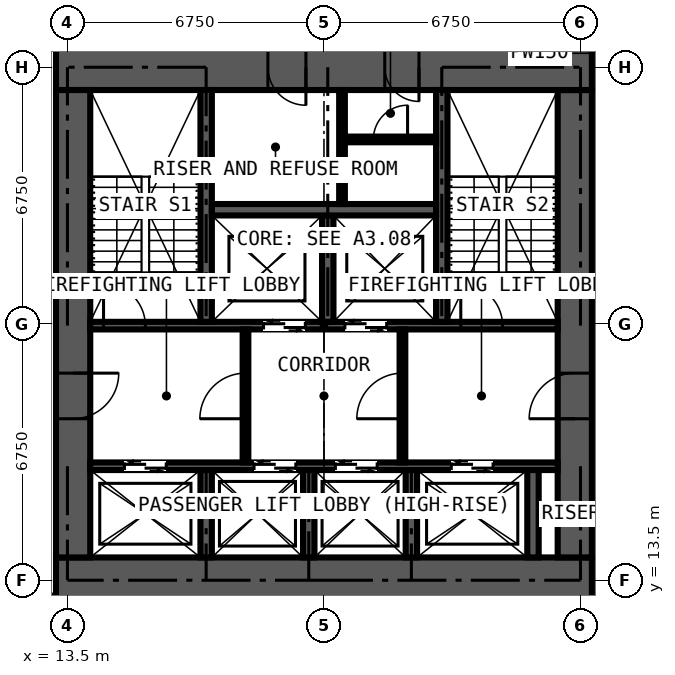
"""IFC4 building model, lengths in metres.
Left out: names, types, materials, properties, quantities, classifications, styles, units other than length and angle.
Written with IfcOpenShell. Run it as: python <this file> out.ifc"""

import sys

from ifc_helpers import new_model, si_unit, direction, frame, frame_2d, origin, place, context, subcontext, project, spatial, rectangle, extrude, element, fill, save


model = new_model("IFC4")
c1 = context("Model", 3, precision=1e-05, world=origin(), true_north=direction((0.0, 1.0)))
c2 = subcontext(c1, "Body", "Model", "MODEL_VIEW")
j1 = project(units=[si_unit("LENGTHUNIT", "METRE"), si_unit("PLANEANGLEUNIT", "RADIAN")], contexts=[c1])
p1 = place(None, origin())
s1 = spatial("IfcSite", under=j1, at=p1, CompositionType="ELEMENT")
p2 = place(p1, origin())
s2 = spatial("IfcBuilding", under=s1, at=p2, CompositionType="ELEMENT")
p3 = place(p2, frame((0.0, 0.0, 225.9)))
s3 = spatial("IfcBuildingStorey", under=s2, at=p3, CompositionType="ELEMENT", Elevation=225.9)
p4 = place(p3, frame((13.2, 13.5, 0.0), z_axis=(0.0, 0.0, 1.0), x_axis=(1.0, 0.0, 0.0)))
e1 = element("IfcWall", 1, at=p4, inside=s3, PredefinedType="SHEAR", context=c2, shape_type="SweptSolid", body=[
    extrude(rectangle(XDim=14.1, YDim=1.2, at=frame_2d((7.05, 0.0))), origin(), (0.0, 0.0, 1.0), 3.6),
])
p5 = place(p3, frame((26.85, 14.1, 0.0), z_axis=(0.0, 0.0, 1.0), x_axis=(0.0, 1.0, 0.0)))
e2 = element("IfcWall", 2, at=p5, inside=s3, PredefinedType="SHEAR", context=c2, shape_type="SweptSolid", body=[
    extrude(rectangle(XDim=12.3, YDim=0.9, at=frame_2d((6.15, 0.0))), origin(), (0.0, 0.0, 1.0), 3.6),
])
p6 = place(p5, frame((3.65, 0.0, 0.0)))
e3 = element("IfcOpeningElement", 3, at=p6, cuts=e2, PredefinedType="OPENING", context=c2, shape_type="SweptSolid", body=[
    extrude(rectangle(XDim=1.2, YDim=2.2, at=frame_2d((0.6, 1.1))), frame((0.0, 0.46, 0.0), z_axis=(0.0, -1.0, 0.0), x_axis=(1.0, 0.0, 0.0)), (0.0, 0.0, 1.0), 0.92),
])
p7 = place(p3, frame((27.3, 27.0, 0.0), z_axis=(0.0, 0.0, 1.0), x_axis=(-1.0, 0.0, 0.0)))
e4 = element("IfcWall", 4, at=p7, inside=s3, PredefinedType="SHEAR", context=c2, shape_type="SweptSolid", body=[
    extrude(rectangle(XDim=14.1, YDim=1.2, at=frame_2d((7.05, 0.0))), origin(), (0.0, 0.0, 1.0), 3.6),
])
p8 = place(p7, frame((4.55, 0.0, 0.0)))
e5 = element("IfcOpeningElement", 5, at=p8, cuts=e4, PredefinedType="OPENING", context=c2, shape_type="SweptSolid", body=[
    extrude(rectangle(XDim=0.9, YDim=2.2, at=frame_2d((0.45, 1.1))), frame((0.0, 0.61, 0.0), z_axis=(0.0, -1.0, 0.0), x_axis=(1.0, 0.0, 0.0)), (0.0, 0.0, 1.0), 1.22),
])
p9 = place(p7, frame((7.525, 0.0, 0.0)))
e6 = element("IfcOpeningElement", 6, at=p9, cuts=e4, PredefinedType="OPENING", context=c2, shape_type="SweptSolid", body=[
    extrude(rectangle(XDim=1.0, YDim=2.2, at=frame_2d((0.5, 1.1))), frame((0.0, 0.61, 0.0), z_axis=(0.0, -1.0, 0.0), x_axis=(1.0, 0.0, 0.0)), (0.0, 0.0, 1.0), 1.22),
])
p10 = place(p3, frame((13.65, 26.4, 0.0), z_axis=(0.0, 0.0, 1.0), x_axis=(0.0, -1.0, 0.0)))
e7 = element("IfcWall", 7, at=p10, inside=s3, PredefinedType="SHEAR", context=c2, shape_type="SweptSolid", body=[
    extrude(rectangle(XDim=12.3, YDim=0.9, at=frame_2d((6.15, 0.0))), origin(), (0.0, 0.0, 1.0), 3.6),
])
p11 = place(p10, frame((7.45, 0.0, 0.0)))
e8 = element("IfcOpeningElement", 8, at=p11, cuts=e7, PredefinedType="OPENING", context=c2, shape_type="SweptSolid", body=[
    extrude(rectangle(XDim=1.2, YDim=2.2, at=frame_2d((0.6, 1.1))), frame((0.0, 0.46, 0.0), z_axis=(0.0, -1.0, 0.0), x_axis=(1.0, 0.0, 0.0)), (0.0, 0.0, 1.0), 0.92),
])
p12 = place(p3, frame((14.1, 16.5, 0.0), z_axis=(0.0, 0.0, 1.0), x_axis=(1.0, 0.0, 0.0)))
e9 = element("IfcWall", 9, at=p12, inside=s3, PredefinedType="SHEAR", context=c2, shape_type="SweptSolid", body=[
    extrude(rectangle(XDim=12.3, YDim=0.2, at=frame_2d((6.15, 0.0))), origin(), (0.0, 0.0, 1.0), 3.6),
])
p13 = place(p12, frame((0.9, 0.0, 0.0)))
e10 = element("IfcOpeningElement", 10, at=p13, cuts=e9, PredefinedType="OPENING", context=c2, shape_type="SweptSolid", body=[
    extrude(rectangle(XDim=1.1, YDim=2.2, at=frame_2d((0.55, 1.1))), frame((0.0, 0.11, 0.0), z_axis=(0.0, -1.0, 0.0), x_axis=(1.0, 0.0, 0.0)), (0.0, 0.0, 1.0), 0.22),
])
p14 = place(p12, frame((4.31, 0.0, 0.0)))
e11 = element("IfcOpeningElement", 11, at=p14, cuts=e9, PredefinedType="OPENING", context=c2, shape_type="SweptSolid", body=[
    extrude(rectangle(XDim=1.1, YDim=2.2, at=frame_2d((0.55, 1.1))), frame((0.0, 0.11, 0.0), z_axis=(0.0, -1.0, 0.0), x_axis=(1.0, 0.0, 0.0)), (0.0, 0.0, 1.0), 0.22),
])
p15 = place(p12, frame((6.45, 0.0, 0.0)))
e12 = element("IfcOpeningElement", 12, at=p15, cuts=e9, PredefinedType="OPENING", context=c2, shape_type="SweptSolid", body=[
    extrude(rectangle(XDim=1.1, YDim=2.2, at=frame_2d((0.55, 1.1))), frame((0.0, 0.11, 0.0), z_axis=(0.0, -1.0, 0.0), x_axis=(1.0, 0.0, 0.0)), (0.0, 0.0, 1.0), 0.22),
])
p16 = place(p12, frame((9.5, 0.0, 0.0)))
e13 = element("IfcOpeningElement", 13, at=p16, cuts=e9, PredefinedType="OPENING", context=c2, shape_type="SweptSolid", body=[
    extrude(rectangle(XDim=1.1, YDim=2.2, at=frame_2d((0.55, 1.1))), frame((0.0, 0.11, 0.0), z_axis=(0.0, -1.0, 0.0), x_axis=(1.0, 0.0, 0.0)), (0.0, 0.0, 1.0), 0.22),
])
p17 = place(p3, frame((14.1, 20.2, 0.0), z_axis=(0.0, 0.0, 1.0), x_axis=(1.0, 0.0, 0.0)))
e14 = element("IfcWall", 14, at=p17, inside=s3, PredefinedType="SHEAR", context=c2, shape_type="SweptSolid", body=[
    extrude(rectangle(XDim=12.3, YDim=0.2, at=frame_2d((6.15, 0.0))), origin(), (0.0, 0.0, 1.0), 3.6),
])
p18 = place(p17, frame((4.56, 0.0, 0.0)))
e15 = element("IfcOpeningElement", 15, at=p18, cuts=e14, PredefinedType="OPENING", context=c2, shape_type="SweptSolid", body=[
    extrude(rectangle(XDim=1.1, YDim=2.2, at=frame_2d((0.55, 1.1))), frame((0.0, 0.11, 0.0), z_axis=(0.0, -1.0, 0.0), x_axis=(1.0, 0.0, 0.0)), (0.0, 0.0, 1.0), 0.22),
])
p19 = place(p17, frame((6.7, 0.0, 0.0)))
e16 = element("IfcOpeningElement", 16, at=p19, cuts=e14, PredefinedType="OPENING", context=c2, shape_type="SweptSolid", body=[
    extrude(rectangle(XDim=1.1, YDim=2.2, at=frame_2d((0.55, 1.1))), frame((0.0, 0.11, 0.0), z_axis=(0.0, -1.0, 0.0), x_axis=(1.0, 0.0, 0.0)), (0.0, 0.0, 1.0), 0.22),
])
p20 = place(p17, frame((0.35, 0.0, 0.0)))
e17 = element("IfcOpeningElement", 17, at=p20, cuts=e14, PredefinedType="OPENING", context=c2, shape_type="SweptSolid", body=[
    extrude(rectangle(XDim=1.1, YDim=2.2, at=frame_2d((0.55, 1.1))), frame((0.0, 0.11, 0.0), z_axis=(0.0, -1.0, 0.0), x_axis=(1.0, 0.0, 0.0)), (0.0, 0.0, 1.0), 0.22),
])
p21 = place(p17, frame((9.75, 0.0, 0.0)))
e18 = element("IfcOpeningElement", 18, at=p21, cuts=e14, PredefinedType="OPENING", context=c2, shape_type="SweptSolid", body=[
    extrude(rectangle(XDim=1.1, YDim=2.2, at=frame_2d((0.55, 1.1))), frame((0.0, 0.11, 0.0), z_axis=(0.0, -1.0, 0.0), x_axis=(1.0, 0.0, 0.0)), (0.0, 0.0, 1.0), 0.22),
])
for number, where, z_axis, x_axis in (
    (19, (17.15, 20.3, 0.0), (0.0, 0.0, 1.0), (0.0, 1.0, 0.0)),
    (20, (23.35, 20.3, 0.0), (0.0, 0.0, 1.0), (0.0, 1.0, 0.0)),
):
    element("IfcWall", number, at=place(p3, frame(where, z_axis=z_axis, x_axis=x_axis)), inside=s3, PredefinedType="SHEAR", context=c2, shape_type="SweptSolid", body=[
        extrude(rectangle(XDim=6.1, YDim=0.3, at=frame_2d((3.05, 0.0))), origin(), (0.0, 0.0, 1.0), 3.6),
    ])
p22 = place(p3, frame((20.35, 20.3, 0.0), z_axis=(0.0, 0.0, 1.0), x_axis=(0.0, 1.0, 0.0)))
e21 = element("IfcWall", 21, at=p22, inside=s3, PredefinedType="SHEAR", context=c2, shape_type="SweptSolid", body=[
    extrude(rectangle(XDim=2.8, YDim=0.3, at=frame_2d((1.4, 0.0))), origin(), (0.0, 0.0, 1.0), 3.6),
])
p23 = place(p3, frame((17.3, 23.25, 0.0), z_axis=(0.0, 0.0, 1.0), x_axis=(1.0, 0.0, 0.0)))
e22 = element("IfcWall", 22, at=p23, inside=s3, PredefinedType="SHEAR", context=c2, shape_type="SweptSolid", body=[
    extrude(rectangle(XDim=5.9, YDim=0.3, at=frame_2d((2.95, 0.0))), origin(), (0.0, 0.0, 1.0), 3.6),
])
for number, where, z_axis, x_axis in (
    (23, (17.15, 14.1, 0.0), (0.0, 0.0, 1.0), (0.0, 1.0, 0.0)),
    (24, (19.85, 14.1, 0.0), (0.0, 0.0, 1.0), (0.0, 1.0, 0.0)),
    (25, (22.55, 14.1, 0.0), (0.0, 0.0, 1.0), (0.0, 1.0, 0.0)),
    (26, (25.75, 14.1, 0.0), (0.0, 0.0, 1.0), (0.0, 1.0, 0.0)),
):
    element("IfcWall", number, at=place(p3, frame(where, z_axis=z_axis, x_axis=x_axis)), inside=s3, PredefinedType="SHEAR", context=c2, shape_type="SweptSolid", body=[
        extrude(rectangle(XDim=2.3, YDim=0.3, at=frame_2d((1.15, 0.0))), origin(), (0.0, 0.0, 1.0), 3.6),
    ])
p24 = place(p3, frame((18.185, 16.6, 0.0), z_axis=(0.0, 0.0, 1.0), x_axis=(0.0, 1.0, 0.0)))
e27 = element("IfcWall", 27, at=p24, inside=s3, PredefinedType="PARTITIONING", context=c2, shape_type="SweptSolid", body=[
    extrude(rectangle(XDim=3.5, YDim=0.15, at=frame_2d((1.75, 0.0))), origin(), (0.0, 0.0, 1.0), 3.375),
])
p25 = place(p24, frame((1.15, 0.0, 0.0)))
e28 = element("IfcOpeningElement", 28, at=p25, cuts=e27, PredefinedType="OPENING", context=c2, shape_type="SweptSolid", body=[
    extrude(rectangle(XDim=1.2, YDim=2.2, at=frame_2d((0.6, 1.1))), frame((0.0, 0.085, 0.0), z_axis=(0.0, -1.0, 0.0), x_axis=(1.0, 0.0, 0.0)), (0.0, 0.0, 1.0), 0.17),
])
p26 = place(p3, frame((22.315, 16.6, 0.0), z_axis=(0.0, 0.0, 1.0), x_axis=(0.0, 1.0, 0.0)))
e29 = element("IfcWall", 29, at=p26, inside=s3, PredefinedType="PARTITIONING", context=c2, shape_type="SweptSolid", body=[
    extrude(rectangle(XDim=3.5, YDim=0.15, at=frame_2d((1.75, 0.0))), origin(), (0.0, 0.0, 1.0), 3.375),
])
p27 = place(p26, frame((1.15, 0.0, 0.0)))
e30 = element("IfcOpeningElement", 30, at=p27, cuts=e29, PredefinedType="OPENING", context=c2, shape_type="SweptSolid", body=[
    extrude(rectangle(XDim=1.2, YDim=2.2, at=frame_2d((0.6, 1.1))), frame((0.0, 0.085, 0.0), z_axis=(0.0, -1.0, 0.0), x_axis=(1.0, 0.0, 0.0)), (0.0, 0.0, 1.0), 0.17),
])
p28 = place(p3, frame((20.725, 23.4, 0.0), z_axis=(0.0, 0.0, 1.0), x_axis=(0.0, 1.0, 0.0)))
e31 = element("IfcWall", 31, at=p28, inside=s3, PredefinedType="PARTITIONING", context=c2, shape_type="SweptSolid", body=[
    extrude(rectangle(XDim=3.0, YDim=0.15, at=frame_2d((1.5, 0.0))), origin(), (0.0, 0.0, 1.0), 3.375),
])
p29 = place(p3, frame((20.8, 25.1, 0.0), z_axis=(0.0, 0.0, 1.0), x_axis=(1.0, 0.0, 0.0)))
e32 = element("IfcWall", 32, at=p29, inside=s3, PredefinedType="PARTITIONING", context=c2, shape_type="SweptSolid", body=[
    extrude(rectangle(XDim=2.4, YDim=0.15, at=frame_2d((1.2, 0.0))), origin(), (0.0, 0.0, 1.0), 3.375),
])
p30 = place(p29, frame((0.75, 0.0, 0.0)))
e33 = element("IfcOpeningElement", 33, at=p30, cuts=e32, PredefinedType="OPENING", context=c2, shape_type="SweptSolid", body=[
    extrude(rectangle(XDim=0.9, YDim=2.2, at=frame_2d((0.45, 1.1))), frame((0.0, 0.085, 0.0), z_axis=(0.0, -1.0, 0.0), x_axis=(1.0, 0.0, 0.0)), (0.0, 0.0, 1.0), 0.17),
])
p31 = place(p13, origin())
e34 = element("IfcDoor", 34, at=p31, inside=s3, OperationType="DOUBLE_DOOR_SLIDING", PredefinedType="DOOR", context=c2, shape_type="SweptSolid", body=[
    extrude(rectangle(XDim=1.1, YDim=2.2, at=frame_2d((0.55, 1.1))), frame((0.0, 0.025, 0.0), z_axis=(0.0, -1.0, 0.0), x_axis=(1.0, 0.0, 0.0)), (0.0, 0.0, 1.0), 0.05),
])
fill(e10, e34)
p32 = place(p14, origin())
e35 = element("IfcDoor", 35, at=p32, inside=s3, OperationType="DOUBLE_DOOR_SLIDING", PredefinedType="DOOR", context=c2, shape_type="SweptSolid", body=[
    extrude(rectangle(XDim=1.1, YDim=2.2, at=frame_2d((0.55, 1.1))), frame((0.0, 0.025, 0.0), z_axis=(0.0, -1.0, 0.0), x_axis=(1.0, 0.0, 0.0)), (0.0, 0.0, 1.0), 0.05),
])
fill(e11, e35)
p33 = place(p15, origin())
e36 = element("IfcDoor", 36, at=p33, inside=s3, OperationType="DOUBLE_DOOR_SLIDING", PredefinedType="DOOR", context=c2, shape_type="SweptSolid", body=[
    extrude(rectangle(XDim=1.1, YDim=2.2, at=frame_2d((0.55, 1.1))), frame((0.0, 0.025, 0.0), z_axis=(0.0, -1.0, 0.0), x_axis=(1.0, 0.0, 0.0)), (0.0, 0.0, 1.0), 0.05),
])
fill(e12, e36)
p34 = place(p16, origin())
e37 = element("IfcDoor", 37, at=p34, inside=s3, OperationType="DOUBLE_DOOR_SLIDING", PredefinedType="DOOR", context=c2, shape_type="SweptSolid", body=[
    extrude(rectangle(XDim=1.1, YDim=2.2, at=frame_2d((0.55, 1.1))), frame((0.0, 0.025, 0.0), z_axis=(0.0, -1.0, 0.0), x_axis=(1.0, 0.0, 0.0)), (0.0, 0.0, 1.0), 0.05),
])
fill(e13, e37)
p35 = place(p18, origin())
e38 = element("IfcDoor", 38, at=p35, inside=s3, OperationType="DOUBLE_DOOR_SLIDING", PredefinedType="DOOR", context=c2, shape_type="SweptSolid", body=[
    extrude(rectangle(XDim=1.1, YDim=2.2, at=frame_2d((0.55, 1.1))), frame((0.0, 0.025, 0.0), z_axis=(0.0, -1.0, 0.0), x_axis=(1.0, 0.0, 0.0)), (0.0, 0.0, 1.0), 0.05),
])
fill(e15, e38)
p36 = place(p19, origin())
e39 = element("IfcDoor", 39, at=p36, inside=s3, OperationType="DOUBLE_DOOR_SLIDING", PredefinedType="DOOR", context=c2, shape_type="SweptSolid", body=[
    extrude(rectangle(XDim=1.1, YDim=2.2, at=frame_2d((0.55, 1.1))), frame((0.0, 0.025, 0.0), z_axis=(0.0, -1.0, 0.0), x_axis=(1.0, 0.0, 0.0)), (0.0, 0.0, 1.0), 0.05),
])
fill(e16, e39)
p37 = place(p11, origin())
e40 = element("IfcDoor", 40, at=p37, inside=s3, OperationType="DOUBLE_DOOR_SINGLE_SWING", PredefinedType="DOOR", context=c2, shape_type="SweptSolid", body=[
    extrude(rectangle(XDim=1.2, YDim=2.2, at=frame_2d((0.6, 1.1))), frame((0.0, 0.025, 0.0), z_axis=(0.0, -1.0, 0.0), x_axis=(1.0, 0.0, 0.0)), (0.0, 0.0, 1.0), 0.05),
])
fill(e8, e40)
p38 = place(p6, origin())
e41 = element("IfcDoor", 41, at=p38, inside=s3, OperationType="DOUBLE_DOOR_SINGLE_SWING", PredefinedType="DOOR", context=c2, shape_type="SweptSolid", body=[
    extrude(rectangle(XDim=1.2, YDim=2.2, at=frame_2d((0.6, 1.1))), frame((0.0, 0.025, 0.0), z_axis=(0.0, -1.0, 0.0), x_axis=(1.0, 0.0, 0.0)), (0.0, 0.0, 1.0), 0.05),
])
fill(e3, e41)
p39 = place(p25, origin())
e42 = element("IfcDoor", 42, at=p39, inside=s3, OperationType="DOUBLE_DOOR_SINGLE_SWING", PredefinedType="DOOR", context=c2, shape_type="SweptSolid", body=[
    extrude(rectangle(XDim=1.2, YDim=2.2, at=frame_2d((0.6, 1.1))), frame((0.0, 0.025, 0.0), z_axis=(0.0, -1.0, 0.0), x_axis=(1.0, 0.0, 0.0)), (0.0, 0.0, 1.0), 0.05),
])
fill(e28, e42)
p40 = place(p27, origin())
e43 = element("IfcDoor", 43, at=p40, inside=s3, OperationType="DOUBLE_DOOR_SINGLE_SWING", PredefinedType="DOOR", context=c2, shape_type="SweptSolid", body=[
    extrude(rectangle(XDim=1.2, YDim=2.2, at=frame_2d((0.6, 1.1))), frame((0.0, 0.025, 0.0), z_axis=(0.0, -1.0, 0.0), x_axis=(1.0, 0.0, 0.0)), (0.0, 0.0, 1.0), 0.05),
])
fill(e30, e43)
p41 = place(p30, origin())
e44 = element("IfcDoor", 44, at=p41, inside=s3, OperationType="SINGLE_SWING_RIGHT", PredefinedType="DOOR", context=c2, shape_type="SweptSolid", body=[
    extrude(rectangle(XDim=0.9, YDim=2.2, at=frame_2d((0.45, 1.1))), frame((0.0, 0.025, 0.0), z_axis=(0.0, -1.0, 0.0), x_axis=(1.0, 0.0, 0.0)), (0.0, 0.0, 1.0), 0.05),
])
fill(e33, e44)
p42 = place(p8, origin())
e45 = element("IfcDoor", 45, at=p42, inside=s3, OperationType="SINGLE_SWING_LEFT", PredefinedType="DOOR", context=c2, shape_type="SweptSolid", body=[
    extrude(rectangle(XDim=0.9, YDim=2.2, at=frame_2d((0.45, 1.1))), frame((0.0, 0.4, 0.0), z_axis=(0.0, -1.0, 0.0), x_axis=(1.0, 0.0, 0.0)), (0.0, 0.0, 1.0), 0.8),
])
fill(e5, e45)
p43 = place(p9, origin())
e46 = element("IfcDoor", 46, at=p43, inside=s3, OperationType="SINGLE_SWING_LEFT", PredefinedType="DOOR", context=c2, shape_type="SweptSolid", body=[
    extrude(rectangle(XDim=1.0, YDim=2.2, at=frame_2d((0.5, 1.1))), frame((0.0, 0.025, 0.0), z_axis=(0.0, -1.0, 0.0), x_axis=(1.0, 0.0, 0.0)), (0.0, 0.0, 1.0), 0.05),
])
fill(e6, e46)
p44 = place(p20, origin())
e47 = element("IfcDoor", 47, at=p44, inside=s3, OperationType="SINGLE_SWING_LEFT", PredefinedType="DOOR", context=c2, shape_type="SweptSolid", body=[
    extrude(rectangle(XDim=1.1, YDim=2.2, at=frame_2d((0.55, 1.1))), frame((0.0, 0.025, 0.0), z_axis=(0.0, -1.0, 0.0), x_axis=(1.0, 0.0, 0.0)), (0.0, 0.0, 1.0), 0.05),
])
fill(e17, e47)
p45 = place(p21, origin())
e48 = element("IfcDoor", 48, at=p45, inside=s3, OperationType="SINGLE_SWING_LEFT", PredefinedType="DOOR", context=c2, shape_type="SweptSolid", body=[
    extrude(rectangle(XDim=1.1, YDim=2.2, at=frame_2d((0.55, 1.1))), frame((0.0, 0.025, 0.0), z_axis=(0.0, -1.0, 0.0), x_axis=(1.0, 0.0, 0.0)), (0.0, 0.0, 1.0), 0.05),
])
fill(e18, e48)
save(model, sys.argv[1])
